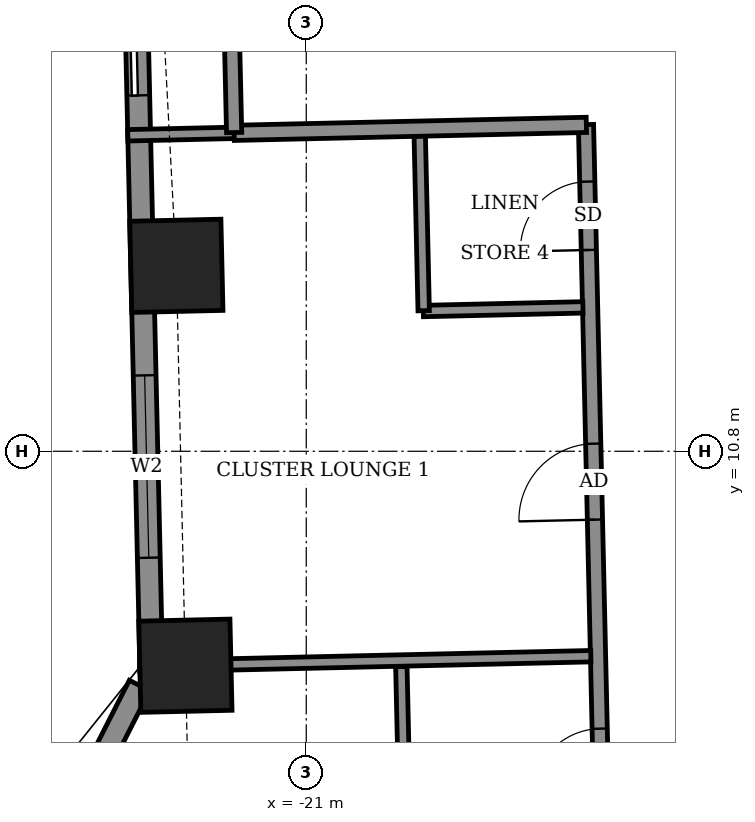
"""IFC4 building model, lengths in metres.
Left out: names, types, materials, properties, quantities, classifications, styles, units other than length and angle.
Written with IfcOpenShell. Run it as: python <this file> out.ifc"""

import sys

from ifc_helpers import new_model, si_unit, direction, frame, frame_2d, origin, origin_2d, place, context, subcontext, project, spatial, rectangle, extrude, element, fill, save


model = new_model("IFC4")
c1 = context("Model", 3, precision=1e-05, world=origin(), true_north=direction((0.0, 1.0)))
c2 = subcontext(c1, "Body", "Model", "MODEL_VIEW")
j1 = project(units=[si_unit("LENGTHUNIT", "METRE"), si_unit("PLANEANGLEUNIT", "RADIAN")], contexts=[c1])
p1 = place(None, origin())
s1 = spatial("IfcSite", under=j1, at=p1, CompositionType="ELEMENT")
p2 = place(p1, origin())
s2 = spatial("IfcBuilding", under=s1, at=p2, CompositionType="ELEMENT")
p3 = place(p2, frame((0.0, 0.0, 186.1)))
s3 = spatial("IfcBuildingStorey", under=s2, at=p3, CompositionType="ELEMENT", Elevation=186.1)
for number, where, z_axis, x_axis in (
    (1, (-22.709, 13.24, -0.55), (0.0, 0.0, 1.0), (0.023, -1.0, 0.0)),
    (2, (-22.59, 7.979, -0.55), (0.0, 0.0, 1.0), (0.023, -1.0, 0.0)),
):
    element("IfcColumn", number, at=place(p3, frame(where, z_axis=z_axis, x_axis=x_axis)), inside=s3, PredefinedType="COLUMN", context=c2, shape_type="SweptSolid", body=[
        extrude(rectangle(XDim=1.2, YDim=1.2, at=origin_2d()), origin(), (0.0, 0.0, 1.0), 3.6),
    ])
p4 = place(p3, frame((-23.275, 18.34, 0.0), z_axis=(0.0, 0.0, 1.0), x_axis=(0.022705985163, -0.999742185885, 0.0)))
e3 = element("IfcWall", 3, at=p4, inside=s3, PredefinedType="SOLIDWALL", context=c2, shape_type="SweptSolid", body=[
    extrude(rectangle(XDim=10.43, YDim=0.3, at=frame_2d((5.215, 0.0))), origin(), (0.0, 0.0, 1.0), 3.05),
])
p5 = place(p4, frame((1.359, 0.0, 0.0)))
e4 = element("IfcOpeningElement", 4, at=p5, cuts=e3, PredefinedType="OPENING", context=c2, shape_type="SweptSolid", body=[
    extrude(rectangle(XDim=1.5, YDim=2.4, at=frame_2d((0.75, 1.2))), frame((0.0, 0.16, 0.0), z_axis=(0.0, -1.0, 0.0), x_axis=(1.0, 0.0, 0.0)), (0.0, 0.0, 1.0), 0.32),
])
p6 = place(p4, frame((6.543, 0.0, 0.9)))
e5 = element("IfcOpeningElement", 5, at=p6, cuts=e3, PredefinedType="OPENING", context=c2, shape_type="SweptSolid", body=[
    extrude(rectangle(XDim=2.4, YDim=1.5, at=frame_2d((1.2, 0.75))), frame((0.0, 0.16, 0.0), z_axis=(0.0, -1.0, 0.0), x_axis=(1.0, 0.0, 0.0)), (0.0, 0.0, 1.0), 0.32),
])
p7 = place(p3, frame((-23.194, 7.719, 0.0), z_axis=(0.0, 0.0, 1.0), x_axis=(-0.452597193435, -0.891715078091, 0.0)))
e6 = element("IfcWall", 6, at=p7, inside=s3, PredefinedType="SOLIDWALL", context=c2, shape_type="SweptSolid", body=[
    extrude(rectangle(XDim=5.397, YDim=0.3, at=frame_2d((2.699, 0.0))), origin(), (0.0, 0.0, 1.0), 3.05),
])
p8 = place(p7, frame((2.007, 0.0, 0.9)))
e7 = element("IfcOpeningElement", 7, at=p8, cuts=e6, PredefinedType="OPENING", context=c2, shape_type="SweptSolid", body=[
    extrude(rectangle(XDim=1.2, YDim=1.5, at=frame_2d((0.6, 0.75))), frame((0.0, 0.16, 0.0), z_axis=(0.0, -1.0, 0.0), x_axis=(1.0, 0.0, 0.0)), (0.0, 0.0, 1.0), 0.32),
])
p9 = place(p3, frame((-16.684, -12.919, 0.0), z_axis=(0.0, 0.0, 1.0), x_axis=(-0.022694293906, 0.999742451346, 0.0)))
e8 = element("IfcWall", 8, at=p9, inside=s3, PredefinedType="PARTITIONING", context=c2, shape_type="SweptSolid", body=[
    extrude(rectangle(XDim=28.024, YDim=0.2, at=frame_2d((14.012, 0.0))), origin(), (0.0, 0.0, 1.0), 3.05),
])
p10 = place(p9, frame((22.825, 0.0, 0.0)))
e9 = element("IfcOpeningElement", 9, at=p10, cuts=e8, PredefinedType="OPENING", context=c2, shape_type="SweptSolid", body=[
    extrude(rectangle(XDim=1.0, YDim=2.1, at=frame_2d((0.5, 1.05))), frame((0.0, 0.11, 0.0), z_axis=(0.0, -1.0, 0.0), x_axis=(1.0, 0.0, 0.0)), (0.0, 0.0, 1.0), 0.22),
])
p11 = place(p9, frame((26.374, 0.0, 0.0)))
e10 = element("IfcOpeningElement", 10, at=p11, cuts=e8, PredefinedType="OPENING", context=c2, shape_type="SweptSolid", body=[
    extrude(rectangle(XDim=0.9, YDim=2.1, at=frame_2d((0.45, 1.05))), frame((0.0, 0.11, 0.0), z_axis=(0.0, -1.0, 0.0), x_axis=(1.0, 0.0, 0.0)), (0.0, 0.0, 1.0), 0.22),
])
p12 = place(p9, frame((16.7, 0.0, 0.0)))
e11 = element("IfcOpeningElement", 11, at=p12, cuts=e8, PredefinedType="OPENING", context=c2, shape_type="SweptSolid", body=[
    extrude(rectangle(XDim=1.0, YDim=2.1, at=frame_2d((0.5, 1.05))), frame((0.0, 0.11, 0.0), z_axis=(0.0, -1.0, 0.0), x_axis=(1.0, 0.0, 0.0)), (0.0, 0.0, 1.0), 0.22),
])
p13 = place(p9, frame((19.175, 0.0, 0.0)))
e12 = element("IfcOpeningElement", 12, at=p13, cuts=e8, PredefinedType="OPENING", context=c2, shape_type="SweptSolid", body=[
    extrude(rectangle(XDim=0.9, YDim=2.1, at=frame_2d((0.45, 1.05))), frame((0.0, 0.11, 0.0), z_axis=(0.0, -1.0, 0.0), x_axis=(1.0, 0.0, 0.0)), (0.0, 0.0, 1.0), 0.22),
])
p14 = place(p9, frame((14.725, 0.0, 0.0)))
e13 = element("IfcOpeningElement", 13, at=p14, cuts=e8, PredefinedType="OPENING", context=c2, shape_type="SweptSolid", body=[
    extrude(rectangle(XDim=1.0, YDim=2.1, at=frame_2d((0.5, 1.05))), frame((0.0, 0.11, 0.0), z_axis=(0.0, -1.0, 0.0), x_axis=(1.0, 0.0, 0.0)), (0.0, 0.0, 1.0), 0.22),
])
p15 = place(p9, frame((12.625, 0.0, 0.0)))
e14 = element("IfcOpeningElement", 14, at=p15, cuts=e8, PredefinedType="OPENING", context=c2, shape_type="SweptSolid", body=[
    extrude(rectangle(XDim=0.9, YDim=2.1, at=frame_2d((0.45, 1.05))), frame((0.0, 0.11, 0.0), z_axis=(0.0, -1.0, 0.0), x_axis=(1.0, 0.0, 0.0)), (0.0, 0.0, 1.0), 0.22),
])
p16 = place(p9, frame((10.375, 0.0, 0.0)))
e15 = element("IfcOpeningElement", 15, at=p16, cuts=e8, PredefinedType="OPENING", context=c2, shape_type="SweptSolid", body=[
    extrude(rectangle(XDim=1.0, YDim=2.1, at=frame_2d((0.5, 1.05))), frame((0.0, 0.11, 0.0), z_axis=(0.0, -1.0, 0.0), x_axis=(1.0, 0.0, 0.0)), (0.0, 0.0, 1.0), 0.22),
])
p17 = place(p9, frame((8.125, 0.0, 0.0)))
e16 = element("IfcOpeningElement", 16, at=p17, cuts=e8, PredefinedType="OPENING", context=c2, shape_type="SweptSolid", body=[
    extrude(rectangle(XDim=0.9, YDim=2.1, at=frame_2d((0.45, 1.05))), frame((0.0, 0.11, 0.0), z_axis=(0.0, -1.0, 0.0), x_axis=(1.0, 0.0, 0.0)), (0.0, 0.0, 1.0), 0.22),
])
p18 = place(p9, frame((3.462, 0.0, 0.0)))
e17 = element("IfcOpeningElement", 17, at=p18, cuts=e8, PredefinedType="OPENING", context=c2, shape_type="SweptSolid", body=[
    extrude(rectangle(XDim=1.0, YDim=2.1, at=frame_2d((0.5, 1.05))), frame((0.0, 0.11, 0.0), z_axis=(0.0, -1.0, 0.0), x_axis=(1.0, 0.0, 0.0)), (0.0, 0.0, 1.0), 0.22),
])
p19 = place(p9, frame((5.625, 0.0, 0.0)))
e18 = element("IfcOpeningElement", 18, at=p19, cuts=e8, PredefinedType="OPENING", context=c2, shape_type="SweptSolid", body=[
    extrude(rectangle(XDim=0.9, YDim=2.1, at=frame_2d((0.45, 1.05))), frame((0.0, 0.11, 0.0), z_axis=(0.0, -1.0, 0.0), x_axis=(1.0, 0.0, 0.0)), (0.0, 0.0, 1.0), 0.22),
])
p20 = place(p3, frame((-19.687, 5.243, 0.0), z_axis=(0.0, 0.0, 1.0), x_axis=(-0.022758040381, 0.999741002259, 0.0)))
e19 = element("IfcWall", 19, at=p20, inside=s3, PredefinedType="PARTITIONING", context=c2, shape_type="SweptSolid", body=[
    extrude(rectangle(XDim=2.725, YDim=0.15, at=frame_2d((1.362, 0.0))), origin(), (0.0, 0.0, 1.0), 3.05),
])
p21 = place(p3, frame((-23.19, 7.969, 0.0), z_axis=(0.0, 0.0, 1.0), x_axis=(0.999741261868, 0.022746633113, 0.0)))
e20 = element("IfcWall", 20, at=p21, inside=s3, PredefinedType="PARTITIONING", context=c2, shape_type="SweptSolid", body=[
    extrude(rectangle(XDim=5.935, YDim=0.15, at=frame_2d((2.968, 0.0))), origin(), (0.0, 0.0, 1.0), 3.05),
])
p22 = place(p3, frame((-19.46, 12.645, 0.0), z_axis=(0.0, 0.0, 1.0), x_axis=(0.999737799372, 0.022898307927, 0.0)))
e21 = element("IfcWall", 21, at=p22, inside=s3, PredefinedType="PARTITIONING", context=c2, shape_type="SweptSolid", body=[
    extrude(rectangle(XDim=2.1, YDim=0.15, at=frame_2d((1.05, 0.0))), origin(), (0.0, 0.0, 1.0), 3.05),
])
p23 = place(p3, frame((-19.455, 12.649, 0.0), z_axis=(0.0, 0.0, 1.0), x_axis=(-0.022603288534, 0.999744513037, 0.0)))
e22 = element("IfcWall", 22, at=p23, inside=s3, PredefinedType="PARTITIONING", context=c2, shape_type="SweptSolid", body=[
    extrude(rectangle(XDim=2.301, YDim=0.15, at=frame_2d((1.15, 0.0))), origin(), (0.0, 0.0, 1.0), 3.05),
])
p24 = place(p3, frame((-23.348, 14.957, 0.0), z_axis=(0.0, 0.0, 1.0), x_axis=(0.999740216184, 0.022792545827, 0.0)))
e23 = element("IfcWall", 23, at=p24, inside=s3, PredefinedType="PARTITIONING", context=c2, shape_type="SweptSolid", body=[
    extrude(rectangle(XDim=1.403, YDim=0.15, at=frame_2d((0.702, 0.0))), origin(), (0.0, 0.0, 1.0), 2.55),
])
p25 = place(p3, frame((-21.949, 14.989, 0.0), z_axis=(0.0, 0.0, 1.0), x_axis=(0.999743491588, 0.022648422179, 0.0)))
e24 = element("IfcWall", 24, at=p25, inside=s3, PredefinedType="PARTITIONING", context=c2, shape_type="SweptSolid", body=[
    extrude(rectangle(XDim=4.635, YDim=0.2, at=frame_2d((2.318, 0.0))), origin(), (0.0, 0.0, 1.0), 3.05),
])
p26 = place(p3, frame((-21.949, 14.993, 0.0), z_axis=(0.0, 0.0, 1.0), x_axis=(-0.022617910375, 0.999744182344, 0.0)))
e25 = element("IfcWall", 25, at=p26, inside=s3, PredefinedType="PARTITIONING", context=c2, shape_type="SweptSolid", body=[
    extrude(rectangle(XDim=1.5, YDim=0.2, at=frame_2d((0.75, 0.0))), origin(), (0.0, 0.0, 1.0), 3.05),
])
p27 = place(p5, origin())
e26 = element("IfcDoor", 26, at=p27, inside=s3, OperationType="SLIDING_TO_LEFT", PredefinedType="DOOR", context=c2, shape_type="SweptSolid", body=[
    extrude(rectangle(XDim=1.5, YDim=2.4, at=frame_2d((0.75, 1.2))), frame((0.0, 0.025, 0.0), z_axis=(0.0, -1.0, 0.0), x_axis=(1.0, 0.0, 0.0)), (0.0, 0.0, 1.0), 0.05),
])
fill(e4, e26)
p28 = place(p6, origin())
e27 = element("IfcWindow", 27, at=p28, inside=s3, PartitioningType="DOUBLE_PANEL_VERTICAL", PredefinedType="WINDOW", context=c2, shape_type="SweptSolid", body=[
    extrude(rectangle(XDim=2.4, YDim=1.5, at=frame_2d((1.2, 0.75))), frame((0.0, 0.03, 0.0), z_axis=(0.0, -1.0, 0.0), x_axis=(1.0, 0.0, 0.0)), (0.0, 0.0, 1.0), 0.06),
])
fill(e5, e27)
p29 = place(p10, origin())
e28 = element("IfcDoor", 28, at=p29, inside=s3, OperationType="SINGLE_SWING_RIGHT", PredefinedType="DOOR", context=c2, shape_type="SweptSolid", body=[
    extrude(rectangle(XDim=1.0, YDim=2.1, at=frame_2d((0.5, 1.05))), frame((0.0, 0.025, 0.0), z_axis=(0.0, -1.0, 0.0), x_axis=(1.0, 0.0, 0.0)), (0.0, 0.0, 1.0), 0.05),
])
fill(e9, e28)
p30 = place(p11, origin())
e29 = element("IfcDoor", 29, at=p30, inside=s3, OperationType="SINGLE_SWING_RIGHT", PredefinedType="DOOR", context=c2, shape_type="SweptSolid", body=[
    extrude(rectangle(XDim=0.9, YDim=2.1, at=frame_2d((0.45, 1.05))), frame((0.0, 0.025, 0.0), z_axis=(0.0, -1.0, 0.0), x_axis=(1.0, 0.0, 0.0)), (0.0, 0.0, 1.0), 0.05),
])
fill(e10, e29)
p31 = place(p13, origin())
e30 = element("IfcDoor", 30, at=p31, inside=s3, OperationType="SINGLE_SWING_LEFT", PredefinedType="DOOR", context=c2, shape_type="SweptSolid", body=[
    extrude(rectangle(XDim=0.9, YDim=2.1, at=frame_2d((0.45, 1.05))), frame((0.0, 0.025, 0.0), z_axis=(0.0, -1.0, 0.0), x_axis=(1.0, 0.0, 0.0)), (0.0, 0.0, 1.0), 0.05),
])
fill(e12, e30)
save(model, sys.argv[1])
